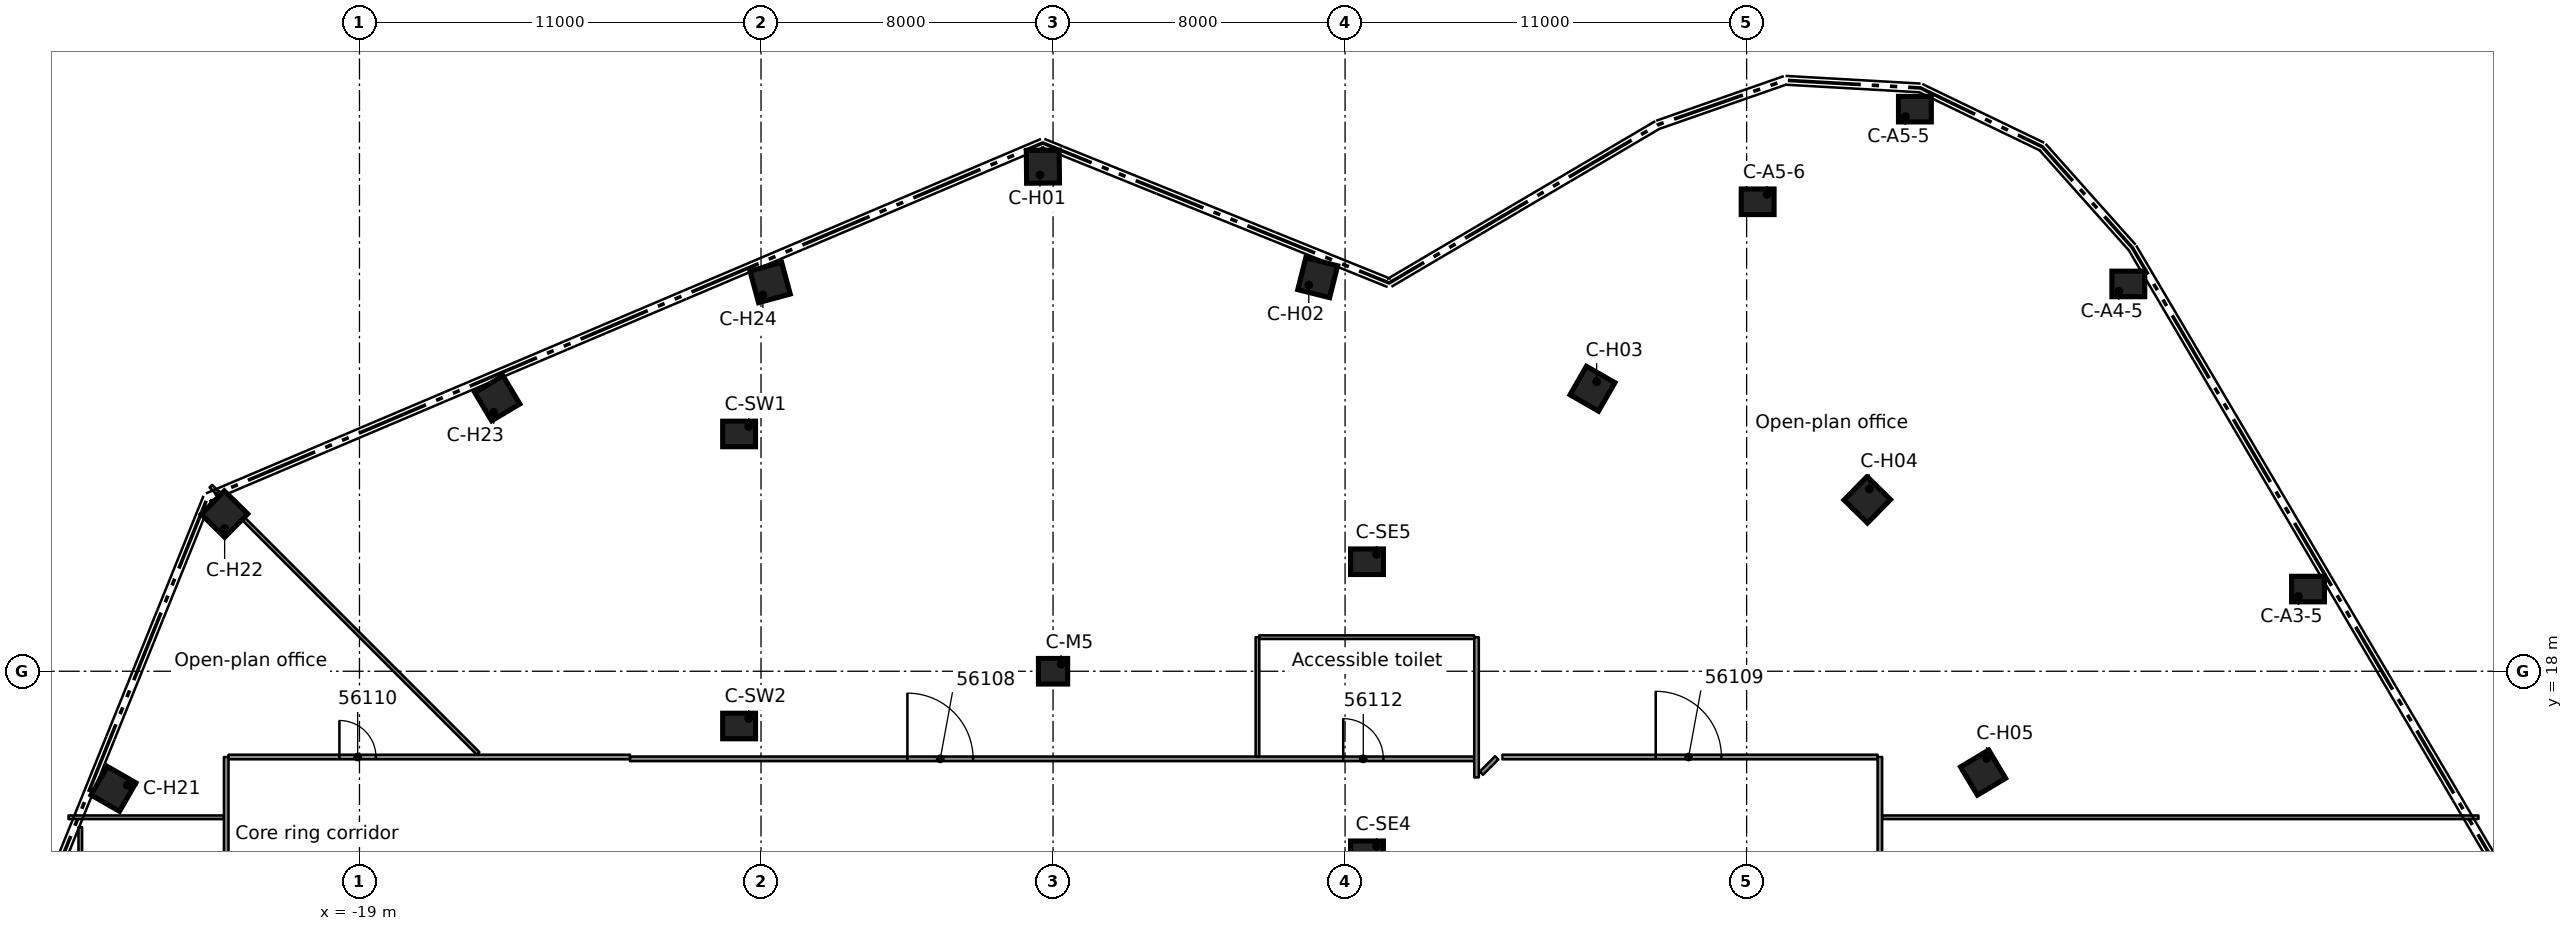
"""IFC4 building model, lengths in metres.
Left out: names, types, materials, properties, quantities, classifications, styles, units other than length and angle.
Written with IfcOpenShell. Run it as: python <this file> out.ifc"""

import sys

from ifc_helpers import new_model, si_unit, direction, frame, frame_2d, origin, origin_2d, place, context, subcontext, project, spatial, rectangle, extrude, element, fill, save


model = new_model("IFC4")
c1 = context("Model", 3, precision=1e-05, world=origin(), true_north=direction((0.0, 1.0)))
c2 = subcontext(c1, "Body", "Model", "MODEL_VIEW")
j1 = project(units=[si_unit("LENGTHUNIT", "METRE"), si_unit("PLANEANGLEUNIT", "RADIAN")], contexts=[c1])
p1 = place(None, origin())
s1 = spatial("IfcSite", under=j1, at=p1, CompositionType="ELEMENT")
p2 = place(p1, origin())
s2 = spatial("IfcBuilding", under=s1, at=p2, CompositionType="ELEMENT")
p3 = place(p2, frame((0.0, 0.0, 278.9)))
s3 = spatial("IfcBuildingStorey", under=s2, at=p3, CompositionType="ELEMENT", Elevation=278.9)
for number, where, z_axis, x_axis in (
    (1, (34.379, 20.251, 0.0), (0.0, 0.0, 1.0), (1.0, 0.0, 0.0)),
    (2, (29.456, 28.609, 0.0), (0.0, 0.0, 1.0), (1.0, 0.0, 0.0)),
    (3, (23.61, 33.397, 0.0), (0.0, 0.0, 1.0), (1.0, 0.0, 0.0)),
    (4, (19.302, 30.86, 0.0), (0.0, 0.0, 1.0), (1.0, 0.0, 0.0)),
):
    element("IfcColumn", number, at=place(p3, frame(where, z_axis=z_axis, x_axis=x_axis)), inside=s3, PredefinedType="COLUMN", context=c2, shape_type="SweptSolid", body=[
        extrude(rectangle(XDim=0.9, YDim=0.7, at=origin_2d()), origin(), (0.0, 0.0, 1.0), 3.5),
    ])
for number, where, z_axis, x_axis in (
    (5, (-0.278, 31.821, 0.0), (0.0, 0.0, 1.0), (-0.009, 1.0, 0.0)),
    (6, (7.25, 28.78, 0.0), (0.0, 0.0, 1.0), (0.244, 0.97, 0.0)),
    (7, (14.777, 25.739, 0.0), (0.0, 0.0, 1.0), (0.498, 0.867, 0.0)),
    (8, (22.305, 22.697, 0.0), (0.0, 0.0, 1.0), (0.701, 0.713, 0.0)),
    (9, (25.477, 15.224, 0.0), (0.0, 0.0, 1.0), (0.858, 0.513, 0.0)),
    (10, (-25.739, 14.777, 0.0), (0.0, 0.0, 1.0), (-0.867, 0.498, 0.0)),
    (11, (-22.697, 22.305, 0.0), (0.0, 0.0, 1.0), (-0.713, 0.701, 0.0)),
    (12, (-15.224, 25.477, 0.0), (0.0, 0.0, 1.0), (-0.513, 0.858, 0.0)),
    (13, (-7.751, 28.649, 0.0), (0.0, 0.0, 1.0), (-0.261, 0.965, 0.0)),
):
    element("IfcColumn", number, at=place(p3, frame(where, z_axis=z_axis, x_axis=x_axis)), inside=s3, PredefinedType="COLUMN", context=c2, shape_type="SweptSolid", body=[
        extrude(rectangle(XDim=0.9, YDim=0.9, at=origin_2d()), origin(), (0.0, 0.0, 1.0), 3.5),
    ])
p4 = place(p3, frame((0.0, 18.0, 0.0), z_axis=(0.0, 0.0, 1.0), x_axis=(1.0, 0.0, 0.0)))
e14 = element("IfcColumn", 14, at=p4, inside=s3, PredefinedType="COLUMN", context=c2, shape_type="SweptSolid", body=[
    extrude(rectangle(XDim=0.8, YDim=0.7, at=origin_2d()), origin(), (0.0, 0.0, 1.0), 3.5),
])
for number, where, z_axis, x_axis in (
    (15, (8.6, 13.0, 0.0), (0.0, 0.0, 1.0), (1.0, 0.0, 0.0)),
    (16, (8.6, 21.0, 0.0), (0.0, 0.0, 1.0), (1.0, 0.0, 0.0)),
    (17, (-8.6, 24.5, 0.0), (0.0, 0.0, 1.0), (1.0, 0.0, 0.0)),
    (18, (-8.6, 16.5, 0.0), (0.0, 0.0, 1.0), (1.0, 0.0, 0.0)),
):
    element("IfcColumn", number, at=place(p3, frame(where, z_axis=z_axis, x_axis=x_axis)), inside=s3, PredefinedType="COLUMN", context=c2, shape_type="SweptSolid", body=[
        extrude(rectangle(XDim=0.9, YDim=0.7, at=origin_2d()), origin(), (0.0, 0.0, 1.0), 3.5),
    ])
p5 = place(p3, frame((-23.071, 23.07, 0.0), z_axis=(0.0, 0.0, 1.0), x_axis=(0.707106781187, -0.707106781187, 0.0)))
e19 = element("IfcWall", 19, at=p5, inside=s3, PredefinedType="PARTITIONING", context=c2, shape_type="SweptSolid", body=[
    extrude(rectangle(XDim=10.354, YDim=0.1, at=frame_2d((5.177, 0.0))), origin(), (0.0, 0.0, 1.0), 3.08),
])
p6 = place(p3, frame((-26.97, 14.0, 0.0), z_axis=(0.0, 0.0, 1.0), x_axis=(1.0, 0.0, 0.0)))
e20 = element("IfcWall", 20, at=p6, inside=s3, PredefinedType="PARTITIONING", context=c2, shape_type="SweptSolid", body=[
    extrude(rectangle(XDim=4.258, YDim=0.1, at=frame_2d((2.129, 0.0))), origin(), (0.0, 0.0, 1.0), 3.08),
])
p7 = place(p3, frame((22.712, 14.0, 0.0), z_axis=(0.0, 0.0, 1.0), x_axis=(1.0, 0.0, 0.0)))
e21 = element("IfcWall", 21, at=p7, inside=s3, PredefinedType="PARTITIONING", context=c2, shape_type="SweptSolid", body=[
    extrude(rectangle(XDim=16.336, YDim=0.1, at=frame_2d((8.168, 0.0))), origin(), (0.0, 0.0, 1.0), 3.08),
])
p8 = place(p3, frame((-11.59, 15.601, 0.0), z_axis=(0.0, 0.0, 1.0), x_axis=(1.0, 0.0, 0.0)))
e22 = element("IfcWall", 22, at=p8, inside=s3, PredefinedType="PARTITIONING", context=c2, shape_type="SweptSolid", body=[
    extrude(rectangle(XDim=23.127, YDim=0.125, at=frame_2d((11.563, 0.0))), origin(), (0.0, 0.0, 1.0), 3.08),
])
p9 = place(p8, frame((7.6, 0.0, 0.0)))
e23 = element("IfcOpeningElement", 23, at=p9, cuts=e22, PredefinedType="OPENING", context=c2, shape_type="SweptSolid", body=[
    extrude(rectangle(XDim=1.8, YDim=2.1, at=frame_2d((0.9, 1.05))), frame((0.0, 0.073, 0.0), z_axis=(0.0, -1.0, 0.0), x_axis=(1.0, 0.0, 0.0)), (0.0, 0.0, 1.0), 0.145),
])
p10 = place(p8, frame((19.539, 0.0, 0.0)))
e24 = element("IfcOpeningElement", 24, at=p10, cuts=e22, PredefinedType="OPENING", context=c2, shape_type="SweptSolid", body=[
    extrude(rectangle(XDim=1.1, YDim=2.1, at=frame_2d((0.55, 1.05))), frame((0.0, 0.073, 0.0), z_axis=(0.0, -1.0, 0.0), x_axis=(1.0, 0.0, 0.0)), (0.0, 0.0, 1.0), 0.145),
])
p11 = place(p3, frame((-22.587, 15.651, 0.0), z_axis=(0.0, 0.0, 1.0), x_axis=(1.0, 0.0, 0.0)))
e25 = element("IfcWall", 25, at=p11, inside=s3, PredefinedType="PARTITIONING", context=c2, shape_type="SweptSolid", body=[
    extrude(rectangle(XDim=10.996, YDim=0.125, at=frame_2d((5.498, 0.0))), origin(), (0.0, 0.0, 1.0), 3.08),
])
p12 = place(p11, frame((3.038, 0.0, 0.0)))
e26 = element("IfcOpeningElement", 26, at=p12, cuts=e25, PredefinedType="OPENING", context=c2, shape_type="SweptSolid", body=[
    extrude(rectangle(XDim=1.0, YDim=2.1, at=frame_2d((0.5, 1.05))), frame((0.0, 0.073, 0.0), z_axis=(0.0, -1.0, 0.0), x_axis=(1.0, 0.0, 0.0)), (0.0, 0.0, 1.0), 0.145),
])
p13 = place(p3, frame((12.311, 15.651, 0.0), z_axis=(0.0, 0.0, 1.0), x_axis=(1.0, 0.0, 0.0)))
e27 = element("IfcWall", 27, at=p13, inside=s3, PredefinedType="PARTITIONING", context=c2, shape_type="SweptSolid", body=[
    extrude(rectangle(XDim=10.276, YDim=0.125, at=frame_2d((5.138, 0.0))), origin(), (0.0, 0.0, 1.0), 3.08),
])
p14 = place(p13, frame((4.199, 0.0, 0.0)))
e28 = element("IfcOpeningElement", 28, at=p14, cuts=e27, PredefinedType="OPENING", context=c2, shape_type="SweptSolid", body=[
    extrude(rectangle(XDim=1.8, YDim=2.1, at=frame_2d((0.9, 1.05))), frame((0.0, 0.073, 0.0), z_axis=(0.0, -1.0, 0.0), x_axis=(1.0, 0.0, 0.0)), (0.0, 0.0, 1.0), 0.145),
])
p15 = place(p3, frame((5.649, 18.933, 0.0), z_axis=(0.0, 0.0, 1.0), x_axis=(1.0, 0.0, 0.0)))
e29 = element("IfcWall", 29, at=p15, inside=s3, PredefinedType="PARTITIONING", context=c2, shape_type="SweptSolid", body=[
    extrude(rectangle(XDim=5.888, YDim=0.1, at=frame_2d((2.944, 0.0))), origin(), (0.0, 0.0, 1.0), 3.08),
])
p16 = place(p3, frame((11.733, 15.207, 0.0), z_axis=(0.0, 0.0, 1.0), x_axis=(0.707312245878, 0.706901256775, 0.0)))
e30 = element("IfcWall", 30, at=p16, inside=s3, PredefinedType="PARTITIONING", context=c2, shape_type="SweptSolid", body=[
    extrude(rectangle(XDim=0.594, YDim=0.125, at=frame_2d((0.297, 0.0))), origin(), (0.0, 0.0, 1.0), 3.08),
])
p17 = place(p3, frame((22.65, 15.651, 0.0), z_axis=(0.0, 0.0, 1.0), x_axis=(0.0, -1.0, 0.0)))
e31 = element("IfcWall", 31, at=p17, inside=s3, PredefinedType="PARTITIONING", context=c2, shape_type="SweptSolid", body=[
    extrude(rectangle(XDim=31.302, YDim=0.125, at=frame_2d((15.651, 0.0))), origin(), (0.0, 0.0, 1.0), 3.08),
])
p18 = place(p17, frame((22.251, 0.0, 0.0)))
e32 = element("IfcOpeningElement", 32, at=p18, cuts=e31, PredefinedType="OPENING", context=c2, shape_type="SweptSolid", body=[
    extrude(rectangle(XDim=0.9, YDim=2.1, at=frame_2d((0.45, 1.05))), frame((0.0, 0.073, 0.0), z_axis=(0.0, -1.0, 0.0), x_axis=(1.0, 0.0, 0.0)), (0.0, 0.0, 1.0), 0.145),
])
p19 = place(p17, frame((11.751, 0.0, 0.0)))
e33 = element("IfcOpeningElement", 33, at=p19, cuts=e31, PredefinedType="OPENING", context=c2, shape_type="SweptSolid", body=[
    extrude(rectangle(XDim=0.9, YDim=2.1, at=frame_2d((0.45, 1.05))), frame((0.0, 0.073, 0.0), z_axis=(0.0, -1.0, 0.0), x_axis=(1.0, 0.0, 0.0)), (0.0, 0.0, 1.0), 0.145),
])
p20 = place(p17, frame((4.251, 0.0, 0.0)))
e34 = element("IfcOpeningElement", 34, at=p20, cuts=e31, PredefinedType="OPENING", context=c2, shape_type="SweptSolid", body=[
    extrude(rectangle(XDim=1.8, YDim=2.1, at=frame_2d((0.9, 1.05))), frame((0.0, 0.073, 0.0), z_axis=(0.0, -1.0, 0.0), x_axis=(1.0, 0.0, 0.0)), (0.0, 0.0, 1.0), 0.145),
])
p21 = place(p3, frame((11.601, 15.092, 0.0), z_axis=(0.0, 0.0, 1.0), x_axis=(0.0, 1.0, 0.0)))
e35 = element("IfcWall", 35, at=p21, inside=s3, PredefinedType="PARTITIONING", context=c2, shape_type="SweptSolid", body=[
    extrude(rectangle(XDim=3.84, YDim=0.125, at=frame_2d((1.92, 0.0))), origin(), (0.0, 0.0, 1.0), 3.08),
])
p22 = place(p3, frame((5.599, 15.664, 0.0), z_axis=(0.0, 0.0, 1.0), x_axis=(0.0, 1.0, 0.0)))
e36 = element("IfcWall", 36, at=p22, inside=s3, PredefinedType="PARTITIONING", context=c2, shape_type="SweptSolid", body=[
    extrude(rectangle(XDim=3.269, YDim=0.1, at=frame_2d((1.635, 0.0))), origin(), (0.0, 0.0, 1.0), 3.08),
])
p23 = place(p3, frame((-22.65, -15.651, 0.0), z_axis=(0.0, 0.0, 1.0), x_axis=(0.0, 1.0, 0.0)))
e37 = element("IfcWall", 37, at=p23, inside=s3, PredefinedType="PARTITIONING", context=c2, shape_type="SweptSolid", body=[
    extrude(rectangle(XDim=31.302, YDim=0.125, at=frame_2d((15.651, 0.0))), origin(), (0.0, 0.0, 1.0), 3.08),
])
p24 = place(p23, frame((12.251, 0.0, 0.0)))
e38 = element("IfcOpeningElement", 38, at=p24, cuts=e37, PredefinedType="OPENING", context=c2, shape_type="SweptSolid", body=[
    extrude(rectangle(XDim=0.9, YDim=2.1, at=frame_2d((0.45, 1.05))), frame((0.0, 0.073, 0.0), z_axis=(0.0, -1.0, 0.0), x_axis=(1.0, 0.0, 0.0)), (0.0, 0.0, 1.0), 0.145),
])
p25 = place(p23, frame((26.252, 0.0, 0.0)))
e39 = element("IfcOpeningElement", 39, at=p25, cuts=e37, PredefinedType="OPENING", context=c2, shape_type="SweptSolid", body=[
    extrude(rectangle(XDim=0.9, YDim=2.1, at=frame_2d((0.45, 1.05))), frame((0.0, 0.073, 0.0), z_axis=(0.0, -1.0, 0.0), x_axis=(1.0, 0.0, 0.0)), (0.0, 0.0, 1.0), 0.145),
])
p26 = place(p3, frame((-26.648, 8.0, 0.0), z_axis=(0.0, 0.0, 1.0), x_axis=(0.0, 1.0, 0.0)))
e40 = element("IfcWall", 40, at=p26, inside=s3, PredefinedType="PARTITIONING", context=c2, shape_type="SweptSolid", body=[
    extrude(rectangle(XDim=5.727, YDim=0.1, at=frame_2d((2.864, 0.0))), origin(), (0.0, 0.0, 1.0), 3.08),
])
p27 = place(p9, origin())
e41 = element("IfcDoor", 41, at=p27, inside=s3, OperationType="DOUBLE_DOOR_SINGLE_SWING", PredefinedType="DOOR", context=c2, shape_type="SweptSolid", body=[
    extrude(rectangle(XDim=1.8, YDim=2.1, at=frame_2d((0.9, 1.05))), frame((0.0, 0.025, 0.0), z_axis=(0.0, -1.0, 0.0), x_axis=(1.0, 0.0, 0.0)), (0.0, 0.0, 1.0), 0.05),
])
fill(e23, e41)
p28 = place(p14, origin())
e42 = element("IfcDoor", 42, at=p28, inside=s3, OperationType="DOUBLE_DOOR_SINGLE_SWING", PredefinedType="DOOR", context=c2, shape_type="SweptSolid", body=[
    extrude(rectangle(XDim=1.8, YDim=2.1, at=frame_2d((0.9, 1.05))), frame((0.0, 0.025, 0.0), z_axis=(0.0, -1.0, 0.0), x_axis=(1.0, 0.0, 0.0)), (0.0, 0.0, 1.0), 0.05),
])
fill(e28, e42)
p29 = place(p12, origin())
e43 = element("IfcDoor", 43, at=p29, inside=s3, OperationType="SINGLE_SWING_LEFT", PredefinedType="DOOR", context=c2, shape_type="SweptSolid", body=[
    extrude(rectangle(XDim=1.0, YDim=2.1, at=frame_2d((0.5, 1.05))), frame((0.0, 0.025, 0.0), z_axis=(0.0, -1.0, 0.0), x_axis=(1.0, 0.0, 0.0)), (0.0, 0.0, 1.0), 0.05),
])
fill(e26, e43)
p30 = place(p10, origin())
e44 = element("IfcDoor", 44, at=p30, inside=s3, OperationType="SINGLE_SWING_RIGHT", PredefinedType="DOOR", context=c2, shape_type="SweptSolid", body=[
    extrude(rectangle(XDim=1.1, YDim=2.1, at=frame_2d((0.55, 1.05))), frame((0.0, 0.025, 0.0), z_axis=(0.0, -1.0, 0.0), x_axis=(1.0, 0.0, 0.0)), (0.0, 0.0, 1.0), 0.05),
])
fill(e24, e44)
save(model, sys.argv[1])
